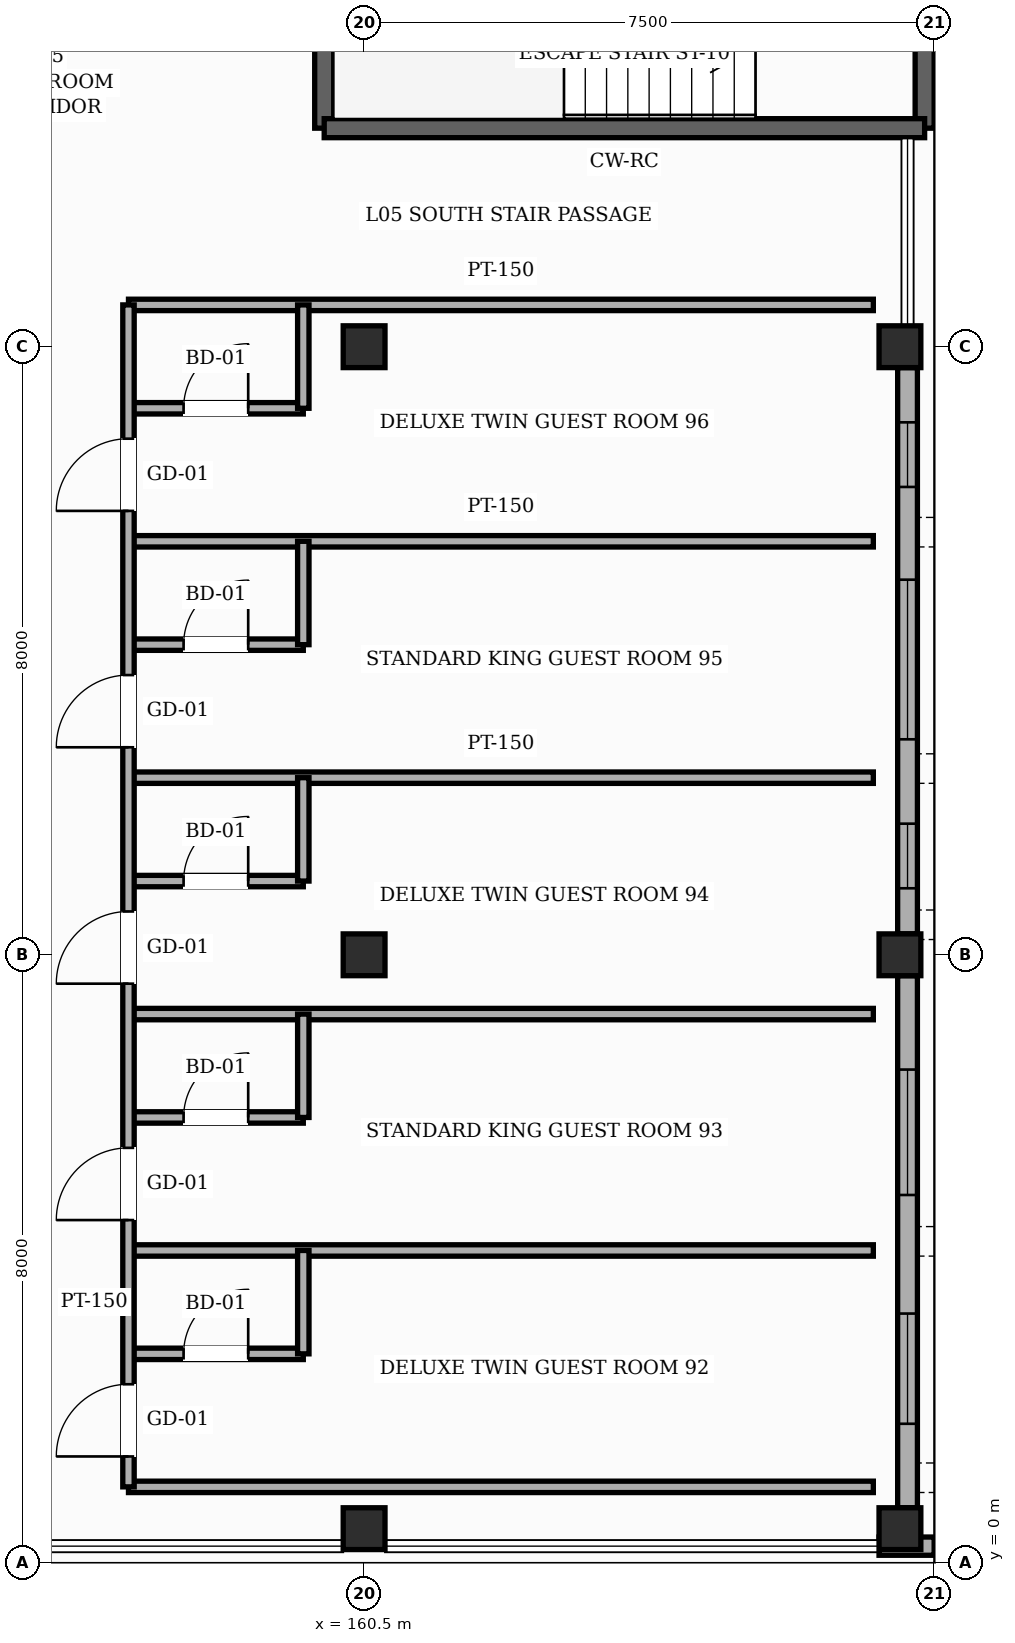
"""IFC4 building model, lengths in metres.
Left out: names, types, materials, properties, quantities, classifications, styles, units other than length and angle.
Written with IfcOpenShell. Run it as: python <this file> out.ifc"""

import sys

from ifc_helpers import new_model, si_unit, direction, frame, frame_2d, origin, origin_2d, place, context, subcontext, project, spatial, rectangle, hollow_rectangle, extrude, element, fill, save


model = new_model("IFC4")
c1 = context("Model", 3, precision=1e-05, world=origin(), true_north=direction((0.0, 1.0)))
c2 = subcontext(c1, "Body", "Model", "MODEL_VIEW")
j1 = project(units=[si_unit("LENGTHUNIT", "METRE"), si_unit("PLANEANGLEUNIT", "RADIAN")], contexts=[c1])
p1 = place(None, origin())
s1 = spatial("IfcSite", under=j1, at=p1, CompositionType="ELEMENT")
p2 = place(p1, origin())
s2 = spatial("IfcBuilding", under=s1, at=p2, CompositionType="ELEMENT")
p3 = place(p2, frame((0.0, 0.0, 24.6)))
s3 = spatial("IfcBuildingStorey", under=s2, at=p3, CompositionType="ELEMENT", Elevation=24.6)
for number, where, z_axis, x_axis in (
    (1, (160.5, 0.45, 0.0), (0.0, 0.0, 1.0), (1.0, 0.0, 0.0)),
    (2, (160.5, 8.0, 0.0), (0.0, 0.0, 1.0), (1.0, 0.0, 0.0)),
    (3, (160.5, 16.0, 0.0), (0.0, 0.0, 1.0), (1.0, 0.0, 0.0)),
    (4, (167.55, 0.45, 0.0), (0.0, 0.0, 1.0), (1.0, 0.0, 0.0)),
    (5, (167.55, 8.0, 0.0), (0.0, 0.0, 1.0), (1.0, 0.0, 0.0)),
    (6, (167.55, 16.0, 0.0), (0.0, 0.0, 1.0), (1.0, 0.0, 0.0)),
):
    element("IfcColumn", number, at=place(p3, frame(where, z_axis=z_axis, x_axis=x_axis)), inside=s3, PredefinedType="COLUMN", context=c2, shape_type="SweptSolid", body=[
        extrude(hollow_rectangle(XDim=0.55, YDim=0.55, WallThickness=0.022, InnerFilletRadius=0.022, OuterFilletRadius=0.044, at=origin_2d()), origin(), (0.0, 0.0, 1.0), 3.6),
    ])
p4 = place(p3, frame((167.65, 7.725, 0.0), z_axis=(0.0, 0.0, 1.0), x_axis=(0.0, -1.0, 0.0)))
e7 = element("IfcWall", 7, at=p4, inside=s3, PredefinedType="SOLIDWALL", context=c2, shape_type="SweptSolid", body=[
    extrude(rectangle(XDim=7.0, YDim=0.26, at=frame_2d((3.5, 0.0))), origin(), (0.0, 0.0, 1.0), 2.755),
])
p5 = place(p4, frame((4.445, 0.0, 0.85)))
e8 = element("IfcOpeningElement", 8, at=p5, cuts=e7, PredefinedType="OPENING", context=c2, shape_type="SweptSolid", body=[
    extrude(rectangle(XDim=1.45, YDim=1.35, at=frame_2d((0.725, 0.675))), frame((0.0, 0.14, 0.0), z_axis=(0.0, -1.0, 0.0), x_axis=(1.0, 0.0, 0.0)), (0.0, 0.0, 1.0), 0.28),
])
p6 = place(p4, frame((1.235, 0.0, 0.85)))
e9 = element("IfcOpeningElement", 9, at=p6, cuts=e7, PredefinedType="OPENING", context=c2, shape_type="SweptSolid", body=[
    extrude(rectangle(XDim=1.65, YDim=1.35, at=frame_2d((0.825, 0.675))), frame((0.0, 0.14, 0.0), z_axis=(0.0, -1.0, 0.0), x_axis=(1.0, 0.0, 0.0)), (0.0, 0.0, 1.0), 0.28),
])
p7 = place(p3, frame((167.65, 15.725, 0.0), z_axis=(0.0, 0.0, 1.0), x_axis=(0.0, -1.0, 0.0)))
e10 = element("IfcWall", 10, at=p7, inside=s3, PredefinedType="SOLIDWALL", context=c2, shape_type="SweptSolid", body=[
    extrude(rectangle(XDim=7.45, YDim=0.26, at=frame_2d((3.725, 0.0))), origin(), (0.0, 0.0, 1.0), 2.755),
])
p8 = place(p7, frame((6.0, 0.0, 0.85)))
e11 = element("IfcOpeningElement", 11, at=p8, cuts=e10, PredefinedType="OPENING", context=c2, shape_type="SweptSolid", body=[
    extrude(rectangle(XDim=0.85, YDim=1.35, at=frame_2d((0.425, 0.675))), frame((0.0, 0.14, 0.0), z_axis=(0.0, -1.0, 0.0), x_axis=(1.0, 0.0, 0.0)), (0.0, 0.0, 1.0), 0.28),
])
p9 = place(p7, frame((2.79, 0.0, 0.85)))
e12 = element("IfcOpeningElement", 12, at=p9, cuts=e10, PredefinedType="OPENING", context=c2, shape_type="SweptSolid", body=[
    extrude(rectangle(XDim=2.1, YDim=1.35, at=frame_2d((1.05, 0.675))), frame((0.0, 0.14, 0.0), z_axis=(0.0, -1.0, 0.0), x_axis=(1.0, 0.0, 0.0)), (0.0, 0.0, 1.0), 0.28),
])
p10 = place(p7, frame((0.72, 0.0, 0.85)))
e13 = element("IfcOpeningElement", 13, at=p10, cuts=e10, PredefinedType="OPENING", context=c2, shape_type="SweptSolid", body=[
    extrude(rectangle(XDim=0.85, YDim=1.35, at=frame_2d((0.425, 0.675))), frame((0.0, 0.14, 0.0), z_axis=(0.0, -1.0, 0.0), x_axis=(1.0, 0.0, 0.0)), (0.0, 0.0, 1.0), 0.28),
])
p11 = place(p3, frame((168.0, 0.22, 0.0), z_axis=(0.0, 0.0, 1.0), x_axis=(-1.0, 0.0, 0.0)))
e14 = element("IfcWall", 14, at=p11, inside=s3, PredefinedType="SOLIDWALL", context=c2, shape_type="SweptSolid", body=[
    extrude(rectangle(XDim=0.725, YDim=0.24, at=frame_2d((0.363, 0.0))), origin(), (0.0, 0.0, 1.0), 3.365),
])
for number, where, z_axis, x_axis in (
    (15, (167.875, 22.225, 0.0), (0.0, 0.0, 1.0), (0.0, -1.0, 0.0)),
    (16, (159.975, 18.875, 0.0), (0.0, 0.0, 1.0), (0.0, 1.0, 0.0)),
):
    element("IfcWall", number, at=place(p3, frame(where, z_axis=z_axis, x_axis=x_axis)), inside=s3, PredefinedType="SHEAR", context=c2, shape_type="SweptSolid", body=[
        extrude(rectangle(XDim=3.35, YDim=0.25, at=frame_2d((1.675, 0.0))), origin(), (0.0, 0.0, 1.0), 3.38),
    ])
p12 = place(p3, frame((167.875, 18.875, 0.0), z_axis=(0.0, 0.0, 1.0), x_axis=(-1.0, 0.0, 0.0)))
e17 = element("IfcWall", 17, at=p12, inside=s3, PredefinedType="SHEAR", context=c2, shape_type="SweptSolid", body=[
    extrude(rectangle(XDim=7.9, YDim=0.25, at=frame_2d((3.95, 0.0))), origin(), (0.0, 0.0, 1.0), 3.38),
])
p13 = place(p3, frame((157.4, 1.0, 0.0), z_axis=(0.0, 0.0, 1.0), x_axis=(1.0, 0.0, 0.0)))
e18 = element("IfcWall", 18, at=p13, inside=s3, PredefinedType="PARTITIONING", context=c2, shape_type="SweptSolid", body=[
    extrude(rectangle(XDim=9.8, YDim=0.15, at=frame_2d((4.9, 0.0))), origin(), (0.0, 0.0, 1.0), 3.365),
])
p14 = place(p3, frame((157.4, 2.75, 0.0), z_axis=(0.0, 0.0, 1.0), x_axis=(1.0, 0.0, 0.0)))
e19 = element("IfcWall", 19, at=p14, inside=s3, PredefinedType="PARTITIONING", context=c2, shape_type="SweptSolid", body=[
    extrude(rectangle(XDim=2.3, YDim=0.15, at=frame_2d((1.15, 0.0))), origin(), (0.0, 0.0, 1.0), 3.365),
])
p15 = place(p14, frame((0.725, 0.0, 0.0)))
e20 = element("IfcOpeningElement", 20, at=p15, cuts=e19, PredefinedType="OPENING", context=c2, shape_type="SweptSolid", body=[
    extrude(rectangle(XDim=0.85, YDim=2.1, at=frame_2d((0.425, 1.05))), frame((0.0, 0.085, 0.0), z_axis=(0.0, -1.0, 0.0), x_axis=(1.0, 0.0, 0.0)), (0.0, 0.0, 1.0), 0.17),
])
p16 = place(p3, frame((157.4, 4.11, 0.0), z_axis=(0.0, 0.0, 1.0), x_axis=(1.0, 0.0, 0.0)))
e21 = element("IfcWall", 21, at=p16, inside=s3, PredefinedType="PARTITIONING", context=c2, shape_type="SweptSolid", body=[
    extrude(rectangle(XDim=9.8, YDim=0.15, at=frame_2d((4.9, 0.0))), origin(), (0.0, 0.0, 1.0), 3.005),
])
p17 = place(p3, frame((157.4, 5.86, 0.0), z_axis=(0.0, 0.0, 1.0), x_axis=(1.0, 0.0, 0.0)))
e22 = element("IfcWall", 22, at=p17, inside=s3, PredefinedType="PARTITIONING", context=c2, shape_type="SweptSolid", body=[
    extrude(rectangle(XDim=2.3, YDim=0.15, at=frame_2d((1.15, 0.0))), origin(), (0.0, 0.0, 1.0), 3.365),
])
p18 = place(p17, frame((0.725, 0.0, 0.0)))
e23 = element("IfcOpeningElement", 23, at=p18, cuts=e22, PredefinedType="OPENING", context=c2, shape_type="SweptSolid", body=[
    extrude(rectangle(XDim=0.85, YDim=2.1, at=frame_2d((0.425, 1.05))), frame((0.0, 0.085, 0.0), z_axis=(0.0, -1.0, 0.0), x_axis=(1.0, 0.0, 0.0)), (0.0, 0.0, 1.0), 0.17),
])
p19 = place(p3, frame((157.4, 7.22, 0.0), z_axis=(0.0, 0.0, 1.0), x_axis=(1.0, 0.0, 0.0)))
e24 = element("IfcWall", 24, at=p19, inside=s3, PredefinedType="PARTITIONING", context=c2, shape_type="SweptSolid", body=[
    extrude(rectangle(XDim=9.8, YDim=0.15, at=frame_2d((4.9, 0.0))), origin(), (0.0, 0.0, 1.0), 3.365),
])
p20 = place(p3, frame((157.4, 8.97, 0.0), z_axis=(0.0, 0.0, 1.0), x_axis=(1.0, 0.0, 0.0)))
e25 = element("IfcWall", 25, at=p20, inside=s3, PredefinedType="PARTITIONING", context=c2, shape_type="SweptSolid", body=[
    extrude(rectangle(XDim=2.3, YDim=0.15, at=frame_2d((1.15, 0.0))), origin(), (0.0, 0.0, 1.0), 3.365),
])
p21 = place(p20, frame((0.725, 0.0, 0.0)))
e26 = element("IfcOpeningElement", 26, at=p21, cuts=e25, PredefinedType="OPENING", context=c2, shape_type="SweptSolid", body=[
    extrude(rectangle(XDim=0.85, YDim=2.1, at=frame_2d((0.425, 1.05))), frame((0.0, 0.085, 0.0), z_axis=(0.0, -1.0, 0.0), x_axis=(1.0, 0.0, 0.0)), (0.0, 0.0, 1.0), 0.17),
])
p22 = place(p3, frame((157.4, 10.33, 0.0), z_axis=(0.0, 0.0, 1.0), x_axis=(1.0, 0.0, 0.0)))
e27 = element("IfcWall", 27, at=p22, inside=s3, PredefinedType="PARTITIONING", context=c2, shape_type="SweptSolid", body=[
    extrude(rectangle(XDim=9.8, YDim=0.15, at=frame_2d((4.9, 0.0))), origin(), (0.0, 0.0, 1.0), 3.365),
])
p23 = place(p3, frame((157.4, 12.08, 0.0), z_axis=(0.0, 0.0, 1.0), x_axis=(1.0, 0.0, 0.0)))
e28 = element("IfcWall", 28, at=p23, inside=s3, PredefinedType="PARTITIONING", context=c2, shape_type="SweptSolid", body=[
    extrude(rectangle(XDim=2.3, YDim=0.15, at=frame_2d((1.15, 0.0))), origin(), (0.0, 0.0, 1.0), 3.005),
])
p24 = place(p23, frame((0.725, 0.0, 0.0)))
e29 = element("IfcOpeningElement", 29, at=p24, cuts=e28, PredefinedType="OPENING", context=c2, shape_type="SweptSolid", body=[
    extrude(rectangle(XDim=0.85, YDim=2.1, at=frame_2d((0.425, 1.05))), frame((0.0, 0.085, 0.0), z_axis=(0.0, -1.0, 0.0), x_axis=(1.0, 0.0, 0.0)), (0.0, 0.0, 1.0), 0.17),
])
p25 = place(p3, frame((157.4, 13.44, 0.0), z_axis=(0.0, 0.0, 1.0), x_axis=(1.0, 0.0, 0.0)))
e30 = element("IfcWall", 30, at=p25, inside=s3, PredefinedType="PARTITIONING", context=c2, shape_type="SweptSolid", body=[
    extrude(rectangle(XDim=9.8, YDim=0.15, at=frame_2d((4.9, 0.0))), origin(), (0.0, 0.0, 1.0), 3.365),
])
p26 = place(p3, frame((157.4, 15.19, 0.0), z_axis=(0.0, 0.0, 1.0), x_axis=(1.0, 0.0, 0.0)))
e31 = element("IfcWall", 31, at=p26, inside=s3, PredefinedType="PARTITIONING", context=c2, shape_type="SweptSolid", body=[
    extrude(rectangle(XDim=2.3, YDim=0.15, at=frame_2d((1.15, 0.0))), origin(), (0.0, 0.0, 1.0), 3.365),
])
p27 = place(p26, frame((0.725, 0.0, 0.0)))
e32 = element("IfcOpeningElement", 32, at=p27, cuts=e31, PredefinedType="OPENING", context=c2, shape_type="SweptSolid", body=[
    extrude(rectangle(XDim=0.85, YDim=2.1, at=frame_2d((0.425, 1.05))), frame((0.0, 0.085, 0.0), z_axis=(0.0, -1.0, 0.0), x_axis=(1.0, 0.0, 0.0)), (0.0, 0.0, 1.0), 0.17),
])
p28 = place(p3, frame((157.4, 16.55, 0.0), z_axis=(0.0, 0.0, 1.0), x_axis=(1.0, 0.0, 0.0)))
e33 = element("IfcWall", 33, at=p28, inside=s3, PredefinedType="PARTITIONING", context=c2, shape_type="SweptSolid", body=[
    extrude(rectangle(XDim=9.8, YDim=0.15, at=frame_2d((4.9, 0.0))), origin(), (0.0, 0.0, 1.0), 3.365),
])
p29 = place(p3, frame((157.4, 1.0, 0.0), z_axis=(0.0, 0.0, 1.0), x_axis=(0.0, 1.0, 0.0)))
e34 = element("IfcWall", 34, at=p29, inside=s3, PredefinedType="PARTITIONING", context=c2, shape_type="SweptSolid", body=[
    extrude(rectangle(XDim=15.55, YDim=0.15, at=frame_2d((7.775, 0.0))), origin(), (0.0, 0.0, 1.0), 3.365),
])
p30 = place(p29, frame((0.4, 0.0, 0.0)))
e35 = element("IfcOpeningElement", 35, at=p30, cuts=e34, PredefinedType="OPENING", context=c2, shape_type="SweptSolid", body=[
    extrude(rectangle(XDim=0.95, YDim=2.15, at=frame_2d((0.475, 1.075))), frame((0.0, 0.085, 0.0), z_axis=(0.0, -1.0, 0.0), x_axis=(1.0, 0.0, 0.0)), (0.0, 0.0, 1.0), 0.17),
])
p31 = place(p29, frame((3.51, 0.0, 0.0)))
e36 = element("IfcOpeningElement", 36, at=p31, cuts=e34, PredefinedType="OPENING", context=c2, shape_type="SweptSolid", body=[
    extrude(rectangle(XDim=0.95, YDim=2.15, at=frame_2d((0.475, 1.075))), frame((0.0, 0.085, 0.0), z_axis=(0.0, -1.0, 0.0), x_axis=(1.0, 0.0, 0.0)), (0.0, 0.0, 1.0), 0.17),
])
p32 = place(p29, frame((6.62, 0.0, 0.0)))
e37 = element("IfcOpeningElement", 37, at=p32, cuts=e34, PredefinedType="OPENING", context=c2, shape_type="SweptSolid", body=[
    extrude(rectangle(XDim=0.95, YDim=2.15, at=frame_2d((0.475, 1.075))), frame((0.0, 0.085, 0.0), z_axis=(0.0, -1.0, 0.0), x_axis=(1.0, 0.0, 0.0)), (0.0, 0.0, 1.0), 0.17),
])
p33 = place(p29, frame((9.73, 0.0, 0.0)))
e38 = element("IfcOpeningElement", 38, at=p33, cuts=e34, PredefinedType="OPENING", context=c2, shape_type="SweptSolid", body=[
    extrude(rectangle(XDim=0.95, YDim=2.15, at=frame_2d((0.475, 1.075))), frame((0.0, 0.085, 0.0), z_axis=(0.0, -1.0, 0.0), x_axis=(1.0, 0.0, 0.0)), (0.0, 0.0, 1.0), 0.17),
])
p34 = place(p29, frame((12.84, 0.0, 0.0)))
e39 = element("IfcOpeningElement", 39, at=p34, cuts=e34, PredefinedType="OPENING", context=c2, shape_type="SweptSolid", body=[
    extrude(rectangle(XDim=0.95, YDim=2.15, at=frame_2d((0.475, 1.075))), frame((0.0, 0.085, 0.0), z_axis=(0.0, -1.0, 0.0), x_axis=(1.0, 0.0, 0.0)), (0.0, 0.0, 1.0), 0.17),
])
p35 = place(p3, frame((159.7, 2.75, 0.0), z_axis=(0.0, 0.0, 1.0), x_axis=(0.0, 1.0, 0.0)))
e40 = element("IfcWall", 40, at=p35, inside=s3, PredefinedType="PARTITIONING", context=c2, shape_type="SweptSolid", body=[
    extrude(rectangle(XDim=1.36, YDim=0.15, at=frame_2d((0.68, 0.0))), origin(), (0.0, 0.0, 1.0), 3.365),
])
p36 = place(p3, frame((159.7, 5.86, 0.0), z_axis=(0.0, 0.0, 1.0), x_axis=(0.0, 1.0, 0.0)))
e41 = element("IfcWall", 41, at=p36, inside=s3, PredefinedType="PARTITIONING", context=c2, shape_type="SweptSolid", body=[
    extrude(rectangle(XDim=1.36, YDim=0.15, at=frame_2d((0.68, 0.0))), origin(), (0.0, 0.0, 1.0), 3.365),
])
p37 = place(p3, frame((159.7, 8.97, 0.0), z_axis=(0.0, 0.0, 1.0), x_axis=(0.0, 1.0, 0.0)))
e42 = element("IfcWall", 42, at=p37, inside=s3, PredefinedType="PARTITIONING", context=c2, shape_type="SweptSolid", body=[
    extrude(rectangle(XDim=1.36, YDim=0.15, at=frame_2d((0.68, 0.0))), origin(), (0.0, 0.0, 1.0), 3.365),
])
p38 = place(p3, frame((159.7, 12.08, 0.0), z_axis=(0.0, 0.0, 1.0), x_axis=(0.0, 1.0, 0.0)))
e43 = element("IfcWall", 43, at=p38, inside=s3, PredefinedType="PARTITIONING", context=c2, shape_type="SweptSolid", body=[
    extrude(rectangle(XDim=1.36, YDim=0.15, at=frame_2d((0.68, 0.0))), origin(), (0.0, 0.0, 1.0), 3.365),
])
p39 = place(p3, frame((159.7, 15.19, 0.0), z_axis=(0.0, 0.0, 1.0), x_axis=(0.0, 1.0, 0.0)))
e44 = element("IfcWall", 44, at=p39, inside=s3, PredefinedType="PARTITIONING", context=c2, shape_type="SweptSolid", body=[
    extrude(rectangle(XDim=1.36, YDim=0.15, at=frame_2d((0.68, 0.0))), origin(), (0.0, 0.0, 1.0), 3.365),
])
p40 = place(p5, origin())
e45 = element("IfcWindow", 45, at=p40, inside=s3, PartitioningType="SINGLE_PANEL", PredefinedType="WINDOW", context=c2, shape_type="SweptSolid", body=[
    extrude(rectangle(XDim=1.45, YDim=1.35, at=frame_2d((0.725, 0.675))), frame((0.0, 0.03, 0.0), z_axis=(0.0, -1.0, 0.0), x_axis=(1.0, 0.0, 0.0)), (0.0, 0.0, 1.0), 0.06),
])
fill(e8, e45)
p41 = place(p6, origin())
e46 = element("IfcWindow", 46, at=p41, inside=s3, PartitioningType="SINGLE_PANEL", PredefinedType="WINDOW", context=c2, shape_type="SweptSolid", body=[
    extrude(rectangle(XDim=1.65, YDim=1.35, at=frame_2d((0.825, 0.675))), frame((0.0, 0.03, 0.0), z_axis=(0.0, -1.0, 0.0), x_axis=(1.0, 0.0, 0.0)), (0.0, 0.0, 1.0), 0.06),
])
fill(e9, e46)
p42 = place(p8, origin())
e47 = element("IfcWindow", 47, at=p42, inside=s3, PartitioningType="SINGLE_PANEL", PredefinedType="WINDOW", context=c2, shape_type="SweptSolid", body=[
    extrude(rectangle(XDim=0.85, YDim=1.35, at=frame_2d((0.425, 0.675))), frame((0.0, 0.03, 0.0), z_axis=(0.0, -1.0, 0.0), x_axis=(1.0, 0.0, 0.0)), (0.0, 0.0, 1.0), 0.06),
])
fill(e11, e47)
p43 = place(p9, origin())
e48 = element("IfcWindow", 48, at=p43, inside=s3, PartitioningType="SINGLE_PANEL", PredefinedType="WINDOW", context=c2, shape_type="SweptSolid", body=[
    extrude(rectangle(XDim=2.1, YDim=1.35, at=frame_2d((1.05, 0.675))), frame((0.0, 0.03, 0.0), z_axis=(0.0, -1.0, 0.0), x_axis=(1.0, 0.0, 0.0)), (0.0, 0.0, 1.0), 0.06),
])
fill(e12, e48)
p44 = place(p10, origin())
e49 = element("IfcWindow", 49, at=p44, inside=s3, PartitioningType="SINGLE_PANEL", PredefinedType="WINDOW", context=c2, shape_type="SweptSolid", body=[
    extrude(rectangle(XDim=0.85, YDim=1.35, at=frame_2d((0.425, 0.675))), frame((0.0, 0.03, 0.0), z_axis=(0.0, -1.0, 0.0), x_axis=(1.0, 0.0, 0.0)), (0.0, 0.0, 1.0), 0.06),
])
fill(e13, e49)
p45 = place(p30, origin())
e50 = element("IfcDoor", 50, at=p45, inside=s3, OperationType="SINGLE_SWING_LEFT", PredefinedType="DOOR", context=c2, shape_type="SweptSolid", body=[
    extrude(rectangle(XDim=0.95, YDim=2.15, at=frame_2d((0.475, 1.075))), frame((0.0, 0.025, 0.0), z_axis=(0.0, -1.0, 0.0), x_axis=(1.0, 0.0, 0.0)), (0.0, 0.0, 1.0), 0.05),
])
fill(e35, e50)
p46 = place(p15, origin())
e51 = element("IfcDoor", 51, at=p46, inside=s3, OperationType="SINGLE_SWING_RIGHT", PredefinedType="DOOR", context=c2, shape_type="SweptSolid", body=[
    extrude(rectangle(XDim=0.85, YDim=2.1, at=frame_2d((0.425, 1.05))), frame((0.0, 0.025, 0.0), z_axis=(0.0, -1.0, 0.0), x_axis=(1.0, 0.0, 0.0)), (0.0, 0.0, 1.0), 0.05),
])
fill(e20, e51)
p47 = place(p31, origin())
e52 = element("IfcDoor", 52, at=p47, inside=s3, OperationType="SINGLE_SWING_LEFT", PredefinedType="DOOR", context=c2, shape_type="SweptSolid", body=[
    extrude(rectangle(XDim=0.95, YDim=2.15, at=frame_2d((0.475, 1.075))), frame((0.0, 0.025, 0.0), z_axis=(0.0, -1.0, 0.0), x_axis=(1.0, 0.0, 0.0)), (0.0, 0.0, 1.0), 0.05),
])
fill(e36, e52)
p48 = place(p18, origin())
e53 = element("IfcDoor", 53, at=p48, inside=s3, OperationType="SINGLE_SWING_RIGHT", PredefinedType="DOOR", context=c2, shape_type="SweptSolid", body=[
    extrude(rectangle(XDim=0.85, YDim=2.1, at=frame_2d((0.425, 1.05))), frame((0.0, 0.025, 0.0), z_axis=(0.0, -1.0, 0.0), x_axis=(1.0, 0.0, 0.0)), (0.0, 0.0, 1.0), 0.05),
])
fill(e23, e53)
p49 = place(p32, origin())
e54 = element("IfcDoor", 54, at=p49, inside=s3, OperationType="SINGLE_SWING_LEFT", PredefinedType="DOOR", context=c2, shape_type="SweptSolid", body=[
    extrude(rectangle(XDim=0.95, YDim=2.15, at=frame_2d((0.475, 1.075))), frame((0.0, 0.025, 0.0), z_axis=(0.0, -1.0, 0.0), x_axis=(1.0, 0.0, 0.0)), (0.0, 0.0, 1.0), 0.05),
])
fill(e37, e54)
p50 = place(p21, origin())
e55 = element("IfcDoor", 55, at=p50, inside=s3, OperationType="SINGLE_SWING_RIGHT", PredefinedType="DOOR", context=c2, shape_type="SweptSolid", body=[
    extrude(rectangle(XDim=0.85, YDim=2.1, at=frame_2d((0.425, 1.05))), frame((0.0, 0.025, 0.0), z_axis=(0.0, -1.0, 0.0), x_axis=(1.0, 0.0, 0.0)), (0.0, 0.0, 1.0), 0.05),
])
fill(e26, e55)
p51 = place(p33, origin())
e56 = element("IfcDoor", 56, at=p51, inside=s3, OperationType="SINGLE_SWING_LEFT", PredefinedType="DOOR", context=c2, shape_type="SweptSolid", body=[
    extrude(rectangle(XDim=0.95, YDim=2.15, at=frame_2d((0.475, 1.075))), frame((0.0, 0.025, 0.0), z_axis=(0.0, -1.0, 0.0), x_axis=(1.0, 0.0, 0.0)), (0.0, 0.0, 1.0), 0.05),
])
fill(e38, e56)
p52 = place(p24, origin())
e57 = element("IfcDoor", 57, at=p52, inside=s3, OperationType="SINGLE_SWING_RIGHT", PredefinedType="DOOR", context=c2, shape_type="SweptSolid", body=[
    extrude(rectangle(XDim=0.85, YDim=2.1, at=frame_2d((0.425, 1.05))), frame((0.0, 0.025, 0.0), z_axis=(0.0, -1.0, 0.0), x_axis=(1.0, 0.0, 0.0)), (0.0, 0.0, 1.0), 0.05),
])
fill(e29, e57)
p53 = place(p34, origin())
e58 = element("IfcDoor", 58, at=p53, inside=s3, OperationType="SINGLE_SWING_LEFT", PredefinedType="DOOR", context=c2, shape_type="SweptSolid", body=[
    extrude(rectangle(XDim=0.95, YDim=2.15, at=frame_2d((0.475, 1.075))), frame((0.0, 0.025, 0.0), z_axis=(0.0, -1.0, 0.0), x_axis=(1.0, 0.0, 0.0)), (0.0, 0.0, 1.0), 0.05),
])
fill(e39, e58)
p54 = place(p27, origin())
e59 = element("IfcDoor", 59, at=p54, inside=s3, OperationType="SINGLE_SWING_RIGHT", PredefinedType="DOOR", context=c2, shape_type="SweptSolid", body=[
    extrude(rectangle(XDim=0.85, YDim=2.1, at=frame_2d((0.425, 1.05))), frame((0.0, 0.025, 0.0), z_axis=(0.0, -1.0, 0.0), x_axis=(1.0, 0.0, 0.0)), (0.0, 0.0, 1.0), 0.05),
])
fill(e32, e59)
save(model, sys.argv[1])
